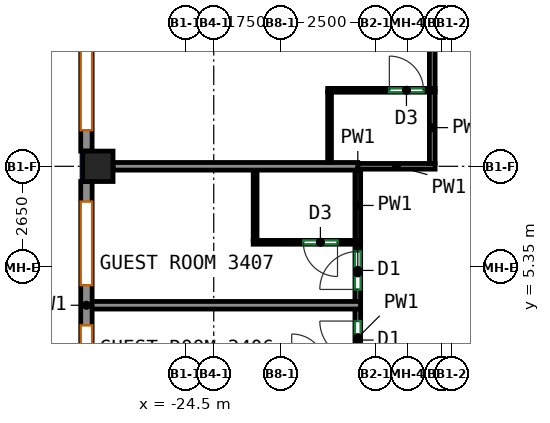
"""IFC4 building model, lengths in metres.
Left out: names, types, materials, properties, quantities, classifications, styles, units other than length and angle.
Written with IfcOpenShell. Run it as: python <this file> out.ifc"""

import sys

from ifc_helpers import new_model, si_unit, direction, frame, frame_2d, origin, origin_2d, place, context, subcontext, project, spatial, rectangle, extrude, source, transform, mapped, element, fill, save


model = new_model("IFC4")
c1 = context("Model", 3, precision=1e-05, world=origin(), true_north=direction((0.0, 1.0)))
c2 = subcontext(c1, "Body", "Model", "MODEL_VIEW")
j1 = project(units=[si_unit("LENGTHUNIT", "METRE"), si_unit("PLANEANGLEUNIT", "RADIAN")], contexts=[c1])
p1 = place(None, origin())
s1 = spatial("IfcSite", under=j1, at=p1, CompositionType="ELEMENT")
p2 = place(p1, origin())
s2 = spatial("IfcBuilding", under=s1, at=p2, CompositionType="ELEMENT")
p3 = place(p2, frame((0.0, 0.0, 150.7)))
s3 = spatial("IfcBuildingStorey", under=s2, at=p3, CompositionType="ELEMENT", Elevation=150.7)
m1 = source(origin(), c2, "Body", "SweptSolid", [
    extrude(rectangle(XDim=0.8, YDim=0.8, at=origin_2d()), origin(), (0.0, 0.0, 1.0), 3.12),
])
p4 = place(p3, frame((-26.8, 8.0, 0.0), z_axis=(0.0, 0.0, 1.0), x_axis=(1.0, 0.0, 0.0)))
e1 = element("IfcColumn", 1, at=p4, inside=s3, PredefinedType="COLUMN", context=c2, shape_type="MappedRepresentation", body=[
    mapped(m1, transform((0.0, 0.0, 0.0))),
])
m2 = source(origin(), c2, "Body", "SweptSolid", [
    extrude(rectangle(XDim=13.2, YDim=0.3, at=frame_2d((6.6, 0.0))), origin(), (0.0, 0.0, 1.0), 3.12),
])
p5 = place(p3, frame((-27.1, 21.6, 0.0), z_axis=(0.0, 0.0, 1.0), x_axis=(0.0, -1.0, 0.0)))
e2 = element("IfcWall", 2, at=p5, inside=s3, PredefinedType="SOLIDWALL", context=c2, shape_type="MappedRepresentation", body=[
    mapped(m2, transform((0.0, 0.0, 0.0))),
])
p6 = place(p5, frame((0.55, 0.0, 0.85)))
e3 = element("IfcOpeningElement", 3, at=p6, cuts=e2, PredefinedType="OPENING", context=c2, shape_type="SweptSolid", body=[
    extrude(rectangle(XDim=2.2, YDim=1.95, at=frame_2d((1.1, 0.975))), frame((0.0, 0.16, 0.0), z_axis=(0.0, -1.0, 0.0), x_axis=(1.0, 0.0, 0.0)), (0.0, 0.0, 1.0), 0.32),
])
p7 = place(p5, frame((3.85, 0.0, 0.85)))
e4 = element("IfcOpeningElement", 4, at=p7, cuts=e2, PredefinedType="OPENING", context=c2, shape_type="SweptSolid", body=[
    extrude(rectangle(XDim=2.2, YDim=1.95, at=frame_2d((1.1, 0.975))), frame((0.0, 0.16, 0.0), z_axis=(0.0, -1.0, 0.0), x_axis=(1.0, 0.0, 0.0)), (0.0, 0.0, 1.0), 0.32),
])
p8 = place(p5, frame((7.15, 0.0, 0.85)))
e5 = element("IfcOpeningElement", 5, at=p8, cuts=e2, PredefinedType="OPENING", context=c2, shape_type="SweptSolid", body=[
    extrude(rectangle(XDim=2.2, YDim=1.95, at=frame_2d((1.1, 0.975))), frame((0.0, 0.16, 0.0), z_axis=(0.0, -1.0, 0.0), x_axis=(1.0, 0.0, 0.0)), (0.0, 0.0, 1.0), 0.32),
])
p9 = place(p5, frame((10.45, 0.0, 0.85)))
e6 = element("IfcOpeningElement", 6, at=p9, cuts=e2, PredefinedType="OPENING", context=c2, shape_type="SweptSolid", body=[
    extrude(rectangle(XDim=2.2, YDim=1.95, at=frame_2d((1.1, 0.975))), frame((0.0, 0.16, 0.0), z_axis=(0.0, -1.0, 0.0), x_axis=(1.0, 0.0, 0.0)), (0.0, 0.0, 1.0), 0.32),
])
m3 = source(origin(), c2, "Body", "SweptSolid", [
    extrude(rectangle(XDim=6.513, YDim=0.3, at=frame_2d((3.256, 0.0))), origin(), (0.0, 0.0, 1.0), 3.12),
])
p10 = place(p3, frame((-27.1, 7.6, 0.0), z_axis=(0.0, 0.0, 1.0), x_axis=(0.0, -1.0, 0.0)))
e7 = element("IfcWall", 7, at=p10, inside=s3, PredefinedType="SOLIDWALL", context=c2, shape_type="MappedRepresentation", body=[
    mapped(m3, transform((0.0, 0.0, 0.0))),
])
p11 = place(p10, frame((0.528, 0.0, 0.85)))
e8 = element("IfcOpeningElement", 8, at=p11, cuts=e7, PredefinedType="OPENING", context=c2, shape_type="SweptSolid", body=[
    extrude(rectangle(XDim=2.2, YDim=1.95, at=frame_2d((1.1, 0.975))), frame((0.0, 0.16, 0.0), z_axis=(0.0, -1.0, 0.0), x_axis=(1.0, 0.0, 0.0)), (0.0, 0.0, 1.0), 0.32),
])
p12 = place(p10, frame((3.784, 0.0, 0.85)))
e9 = element("IfcOpeningElement", 9, at=p12, cuts=e7, PredefinedType="OPENING", context=c2, shape_type="SweptSolid", body=[
    extrude(rectangle(XDim=2.2, YDim=1.95, at=frame_2d((1.1, 0.975))), frame((0.0, 0.16, 0.0), z_axis=(0.0, -1.0, 0.0), x_axis=(1.0, 0.0, 0.0)), (0.0, 0.0, 1.0), 0.32),
])
p13 = place(p3, frame((-19.959, 2.728, 0.0), z_axis=(0.0, 0.0, 1.0), x_axis=(0.0, 1.0, 0.0)))
e10 = element("IfcWall", 10, at=p13, inside=s3, PredefinedType="PARTITIONING", context=c2, shape_type="SweptSolid", body=[
    extrude(rectangle(XDim=1.526, YDim=0.15, at=frame_2d((0.763, 0.0))), origin(), (0.0, 0.0, 1.0), 3.12),
])
p14 = place(p13, frame((0.2, 0.0, 0.0)))
e11 = element("IfcOpeningElement", 11, at=p14, cuts=e10, PredefinedType="OPENING", context=c2, shape_type="SweptSolid", body=[
    extrude(rectangle(XDim=1.0, YDim=2.1, at=frame_2d((0.5, 1.05))), frame((0.0, 0.085, 0.0), z_axis=(0.0, -1.0, 0.0), x_axis=(1.0, 0.0, 0.0)), (0.0, 0.0, 1.0), 0.17),
])
p15 = place(p3, frame((-19.959, 4.434, 0.0), z_axis=(0.0, 0.0, 1.0), x_axis=(0.0, 1.0, 0.0)))
e12 = element("IfcWall", 12, at=p15, inside=s3, PredefinedType="PARTITIONING", context=c2, shape_type="SweptSolid", body=[
    extrude(rectangle(XDim=1.526, YDim=0.15, at=frame_2d((0.763, 0.0))), origin(), (0.0, 0.0, 1.0), 3.12),
])
p16 = place(p15, frame((0.326, 0.0, 0.0)))
e13 = element("IfcOpeningElement", 13, at=p16, cuts=e12, PredefinedType="OPENING", context=c2, shape_type="SweptSolid", body=[
    extrude(rectangle(XDim=1.0, YDim=2.1, at=frame_2d((0.5, 1.05))), frame((0.0, 0.085, 0.0), z_axis=(0.0, -1.0, 0.0), x_axis=(1.0, 0.0, 0.0)), (0.0, 0.0, 1.0), 0.17),
])
p17 = place(p3, frame((-19.959, 6.04, 0.0), z_axis=(0.0, 0.0, 1.0), x_axis=(0.0, 1.0, 0.0)))
e14 = element("IfcWall", 14, at=p17, inside=s3, PredefinedType="PARTITIONING", context=c2, shape_type="SweptSolid", body=[
    extrude(rectangle(XDim=1.86, YDim=0.15, at=frame_2d((0.93, 0.0))), origin(), (0.0, 0.0, 1.0), 3.12),
])
p18 = place(p3, frame((-18.0, 10.04, 0.0), z_axis=(0.0, 0.0, 1.0), x_axis=(0.0, 1.0, 0.0)))
e15 = element("IfcWall", 15, at=p18, inside=s3, PredefinedType="PARTITIONING", context=c2, shape_type="SweptSolid", body=[
    extrude(rectangle(XDim=11.885, YDim=0.15, at=frame_2d((5.942, 0.0))), origin(), (0.0, 0.0, 1.0), 3.12),
])
p19 = place(p18, frame((3.225, 0.0, 0.0)))
e16 = element("IfcOpeningElement", 16, at=p19, cuts=e15, PredefinedType="OPENING", context=c2, shape_type="SweptSolid", body=[
    extrude(rectangle(XDim=1.0, YDim=2.1, at=frame_2d((0.5, 1.05))), frame((0.0, 0.085, 0.0), z_axis=(0.0, -1.0, 0.0), x_axis=(1.0, 0.0, 0.0)), (0.0, 0.0, 1.0), 0.17),
])
p20 = place(p3, frame((-17.925, 8.0, 0.0), z_axis=(0.0, 0.0, 1.0), x_axis=(-1.0, 0.0, 0.0)))
e17 = element("IfcWall", 17, at=p20, inside=s3, PredefinedType="PARTITIONING", context=c2, shape_type="SweptSolid", body=[
    extrude(rectangle(XDim=2.034, YDim=0.15, at=frame_2d((1.017, 0.0))), origin(), (0.0, 0.0, 1.0), 3.12),
])
p21 = place(p3, frame((-18.0, 8.075, 0.0), z_axis=(0.0, 0.0, 1.0), x_axis=(0.0, 1.0, 0.0)))
e18 = element("IfcWall", 18, at=p21, inside=s3, PredefinedType="PARTITIONING", context=c2, shape_type="SweptSolid", body=[
    extrude(rectangle(XDim=1.885, YDim=0.15, at=frame_2d((0.942, 0.0))), origin(), (0.0, 0.0, 1.0), 3.12),
])
p22 = place(p3, frame((-27.0, 4.344, 0.0), z_axis=(0.0, 0.0, 1.0), x_axis=(1.0, 0.0, 0.0)))
e19 = element("IfcWall", 19, at=p22, inside=s3, PredefinedType="PARTITIONING", context=c2, shape_type="SweptSolid", body=[
    extrude(rectangle(XDim=7.114, YDim=0.2, at=frame_2d((3.557, 0.0))), origin(), (0.0, 0.0, 1.0), 3.12),
])
p23 = place(p3, frame((-19.886, 6.0, 0.0), z_axis=(0.0, 0.0, 1.0), x_axis=(-1.0, 0.0, 0.0)))
e20 = element("IfcWall", 20, at=p23, inside=s3, PredefinedType="PARTITIONING", context=c2, shape_type="SweptSolid", body=[
    extrude(rectangle(XDim=2.825, YDim=0.1, at=frame_2d((1.413, 0.0))), origin(), (0.0, 0.0, 1.0), 3.12),
])
p24 = place(p23, frame((0.607, 0.0, 0.0)))
e21 = element("IfcOpeningElement", 21, at=p24, cuts=e20, PredefinedType="OPENING", context=c2, shape_type="SweptSolid", body=[
    extrude(rectangle(XDim=0.9, YDim=2.1, at=frame_2d((0.45, 1.05))), frame((0.0, 0.06, 0.0), z_axis=(0.0, -1.0, 0.0), x_axis=(1.0, 0.0, 0.0)), (0.0, 0.0, 1.0), 0.12),
])
p25 = place(p3, frame((-22.661, 6.05, 0.0), z_axis=(0.0, 0.0, 1.0), x_axis=(0.0, 1.0, 0.0)))
e22 = element("IfcWall", 22, at=p25, inside=s3, PredefinedType="PARTITIONING", context=c2, shape_type="SweptSolid", body=[
    extrude(rectangle(XDim=1.85, YDim=0.1, at=frame_2d((0.925, 0.0))), origin(), (0.0, 0.0, 1.0), 3.12),
])
p26 = place(p3, frame((-26.4, 8.0, 0.0), z_axis=(0.0, 0.0, 1.0), x_axis=(1.0, 0.0, 0.0)))
e23 = element("IfcWall", 23, at=p26, inside=s3, PredefinedType="PARTITIONING", context=c2, shape_type="SweptSolid", body=[
    extrude(rectangle(XDim=6.439, YDim=0.2, at=frame_2d((3.219, 0.0))), origin(), (0.0, 0.0, 1.0), 3.12),
])
p27 = place(p3, frame((-20.752, 10.0, 0.0), z_axis=(0.0, 0.0, 1.0), x_axis=(1.0, 0.0, 0.0)))
e24 = element("IfcWall", 24, at=p27, inside=s3, PredefinedType="PARTITIONING", context=c2, shape_type="SweptSolid", body=[
    extrude(rectangle(XDim=2.825, YDim=0.1, at=frame_2d((1.413, 0.0))), origin(), (0.0, 0.0, 1.0), 3.12),
])
p28 = place(p27, frame((1.623, 0.0, 0.0)))
e25 = element("IfcOpeningElement", 25, at=p28, cuts=e24, PredefinedType="OPENING", context=c2, shape_type="SweptSolid", body=[
    extrude(rectangle(XDim=0.9, YDim=2.1, at=frame_2d((0.45, 1.05))), frame((0.0, 0.06, 0.0), z_axis=(0.0, -1.0, 0.0), x_axis=(1.0, 0.0, 0.0)), (0.0, 0.0, 1.0), 0.12),
])
p29 = place(p3, frame((-20.702, 8.1, 0.0), z_axis=(0.0, 0.0, 1.0), x_axis=(0.0, 1.0, 0.0)))
e26 = element("IfcWall", 26, at=p29, inside=s3, PredefinedType="PARTITIONING", context=c2, shape_type="SweptSolid", body=[
    extrude(rectangle(XDim=1.85, YDim=0.1, at=frame_2d((0.925, 0.0))), origin(), (0.0, 0.0, 1.0), 3.12),
])
p30 = place(p9, origin())
e27 = element("IfcWindow", 27, at=p30, inside=s3, PartitioningType="SINGLE_PANEL", PredefinedType="WINDOW", context=c2, shape_type="SweptSolid", body=[
    extrude(rectangle(XDim=2.2, YDim=1.95, at=frame_2d((1.1, 0.975))), frame((0.0, 0.03, 0.0), z_axis=(0.0, -1.0, 0.0), x_axis=(1.0, 0.0, 0.0)), (0.0, 0.0, 1.0), 0.06),
])
fill(e6, e27)
p31 = place(p11, origin())
e28 = element("IfcWindow", 28, at=p31, inside=s3, PartitioningType="SINGLE_PANEL", PredefinedType="WINDOW", context=c2, shape_type="SweptSolid", body=[
    extrude(rectangle(XDim=2.2, YDim=1.95, at=frame_2d((1.1, 0.975))), frame((0.0, 0.03, 0.0), z_axis=(0.0, -1.0, 0.0), x_axis=(1.0, 0.0, 0.0)), (0.0, 0.0, 1.0), 0.06),
])
fill(e8, e28)
p32 = place(p12, origin())
e29 = element("IfcWindow", 29, at=p32, inside=s3, PartitioningType="SINGLE_PANEL", PredefinedType="WINDOW", context=c2, shape_type="SweptSolid", body=[
    extrude(rectangle(XDim=2.2, YDim=1.95, at=frame_2d((1.1, 0.975))), frame((0.0, 0.03, 0.0), z_axis=(0.0, -1.0, 0.0), x_axis=(1.0, 0.0, 0.0)), (0.0, 0.0, 1.0), 0.06),
])
fill(e9, e29)
p33 = place(p14, origin())
e30 = element("IfcDoor", 30, at=p33, inside=s3, OperationType="SINGLE_SWING_RIGHT", PredefinedType="DOOR", context=c2, shape_type="SweptSolid", body=[
    extrude(rectangle(XDim=1.0, YDim=2.1, at=frame_2d((0.5, 1.05))), frame((0.0, 0.025, 0.0), z_axis=(0.0, -1.0, 0.0), x_axis=(1.0, 0.0, 0.0)), (0.0, 0.0, 1.0), 0.05),
])
fill(e11, e30)
p34 = place(p16, origin())
e31 = element("IfcDoor", 31, at=p34, inside=s3, OperationType="SINGLE_SWING_LEFT", PredefinedType="DOOR", context=c2, shape_type="SweptSolid", body=[
    extrude(rectangle(XDim=1.0, YDim=2.1, at=frame_2d((0.5, 1.05))), frame((0.0, 0.025, 0.0), z_axis=(0.0, -1.0, 0.0), x_axis=(1.0, 0.0, 0.0)), (0.0, 0.0, 1.0), 0.05),
])
fill(e13, e31)
p35 = place(p24, origin())
e32 = element("IfcDoor", 32, at=p35, inside=s3, OperationType="SINGLE_SWING_LEFT", PredefinedType="DOOR", context=c2, shape_type="SweptSolid", body=[
    extrude(rectangle(XDim=0.9, YDim=2.1, at=frame_2d((0.45, 1.05))), frame((0.0, 0.025, 0.0), z_axis=(0.0, -1.0, 0.0), x_axis=(1.0, 0.0, 0.0)), (0.0, 0.0, 1.0), 0.05),
])
fill(e21, e32)
p36 = place(p28, origin())
e33 = element("IfcDoor", 33, at=p36, inside=s3, OperationType="SINGLE_SWING_LEFT", PredefinedType="DOOR", context=c2, shape_type="SweptSolid", body=[
    extrude(rectangle(XDim=0.9, YDim=2.1, at=frame_2d((0.45, 1.05))), frame((0.0, 0.025, 0.0), z_axis=(0.0, -1.0, 0.0), x_axis=(1.0, 0.0, 0.0)), (0.0, 0.0, 1.0), 0.05),
])
fill(e25, e33)
save(model, sys.argv[1])
